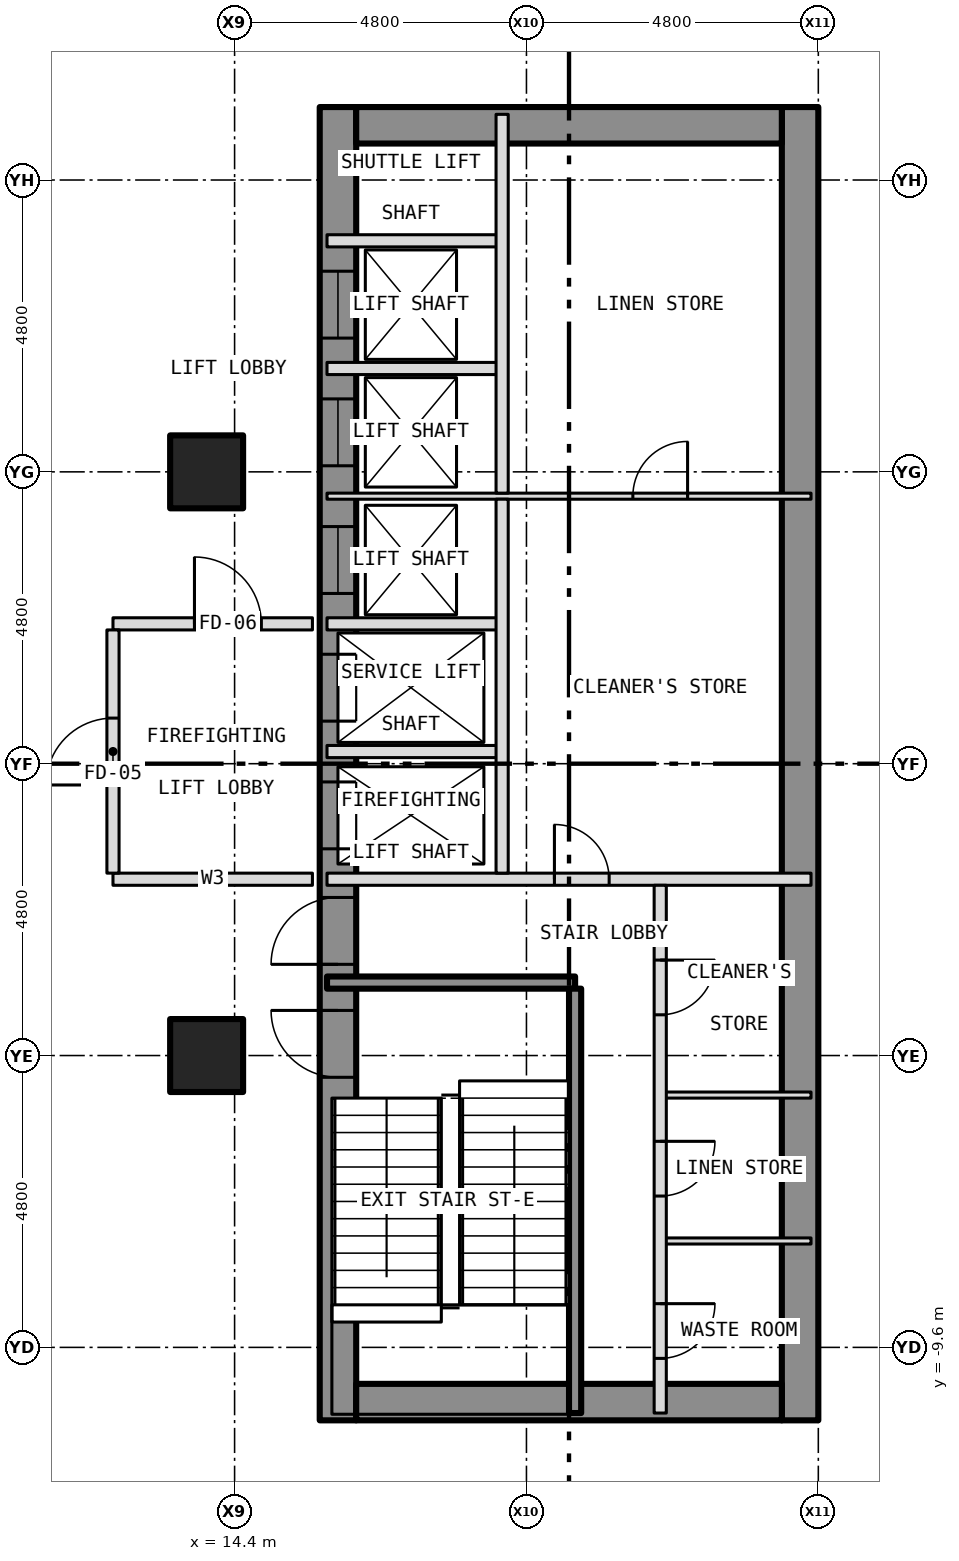
"""IFC4 building model, lengths in metres.
Left out: names, types, materials, properties, quantities, classifications, styles, units other than length and angle.
Written with IfcOpenShell. Run it as: python <this file> out.ifc"""

import sys

from ifc_helpers import new_model, si_unit, direction, frame, frame_2d, origin, origin_2d, place, context, subcontext, project, spatial, rectangle, hollow_rectangle, extrude, element, fill, save


model = new_model("IFC4")
c1 = context("Model", 3, precision=1e-05, world=origin(), true_north=direction((0.0, 1.0)))
c2 = subcontext(c1, "Body", "Model", "MODEL_VIEW")
j1 = project(units=[si_unit("LENGTHUNIT", "METRE"), si_unit("PLANEANGLEUNIT", "RADIAN")], contexts=[c1])
p1 = place(None, origin())
s1 = spatial("IfcSite", under=j1, at=p1, CompositionType="ELEMENT")
p2 = place(p1, origin())
s2 = spatial("IfcBuilding", under=s1, at=p2, CompositionType="ELEMENT")
p3 = place(p2, frame((0.0, 0.0, 20.0)))
s3 = spatial("IfcBuildingStorey", under=s2, at=p3, CompositionType="ELEMENT", Elevation=20.0)
for number, where, z_axis, x_axis in (
    (1, (13.94, -4.8, -0.2), (0.0, 0.0, 1.0), (1.0, 0.0, 0.0)),
    (2, (13.94, 4.8, -0.2), (0.0, 0.0, 1.0), (1.0, 0.0, 0.0)),
):
    element("IfcColumn", number, at=place(p3, frame(where, z_axis=z_axis, x_axis=x_axis)), inside=s3, PredefinedType="COLUMN", context=c2, shape_type="SweptSolid", body=[
        extrude(hollow_rectangle(XDim=1.2, YDim=1.2, WallThickness=0.07, at=origin_2d()), origin(), (0.0, 0.0, 1.0), 4.5),
    ])
p4 = place(p3, frame((16.1, -10.8, 0.0), z_axis=(0.0, 0.0, 1.0), x_axis=(0.0, 1.0, 0.0)))
e3 = element("IfcWall", 3, at=p4, inside=s3, PredefinedType="SHEAR", context=c2, shape_type="SweptSolid", body=[
    extrude(rectangle(XDim=21.6, YDim=0.6, at=frame_2d((10.8, 0.0))), origin(), (0.0, 0.0, 1.0), 4.2),
])
p5 = place(p4, frame((9.4, 0.0, 0.0)))
e4 = element("IfcOpeningElement", 4, at=p5, cuts=e3, PredefinedType="OPENING", context=c2, shape_type="SweptSolid", body=[
    extrude(rectangle(XDim=1.1, YDim=2.1, at=frame_2d((0.55, 1.05))), frame((0.0, 0.312, 0.0), z_axis=(0.0, -1.0, 0.0), x_axis=(1.0, 0.0, 0.0)), (0.0, 0.0, 1.0), 0.624),
])
p6 = place(p4, frame((11.5, 0.0, 0.0)))
e5 = element("IfcOpeningElement", 5, at=p6, cuts=e3, PredefinedType="OPENING", context=c2, shape_type="SweptSolid", body=[
    extrude(rectangle(XDim=1.1, YDim=2.1, at=frame_2d((0.55, 1.05))), frame((0.0, 0.312, 0.0), z_axis=(0.0, -1.0, 0.0), x_axis=(1.0, 0.0, 0.0)), (0.0, 0.0, 1.0), 0.624),
])
p7 = place(p4, frame((13.6, 0.0, 0.0)))
e6 = element("IfcOpeningElement", 6, at=p7, cuts=e3, PredefinedType="OPENING", context=c2, shape_type="SweptSolid", body=[
    extrude(rectangle(XDim=1.1, YDim=2.1, at=frame_2d((0.55, 1.05))), frame((0.0, 0.312, 0.0), z_axis=(0.0, -1.0, 0.0), x_axis=(1.0, 0.0, 0.0)), (0.0, 0.0, 1.0), 0.624),
])
p8 = place(p4, frame((15.7, 0.0, 0.0)))
e7 = element("IfcOpeningElement", 7, at=p8, cuts=e3, PredefinedType="OPENING", context=c2, shape_type="SweptSolid", body=[
    extrude(rectangle(XDim=1.1, YDim=2.1, at=frame_2d((0.55, 1.05))), frame((0.0, 0.312, 0.0), z_axis=(0.0, -1.0, 0.0), x_axis=(1.0, 0.0, 0.0)), (0.0, 0.0, 1.0), 0.624),
])
p9 = place(p4, frame((17.8, 0.0, 0.0)))
e8 = element("IfcOpeningElement", 8, at=p9, cuts=e3, PredefinedType="OPENING", context=c2, shape_type="SweptSolid", body=[
    extrude(rectangle(XDim=1.1, YDim=2.1, at=frame_2d((0.55, 1.05))), frame((0.0, 0.312, 0.0), z_axis=(0.0, -1.0, 0.0), x_axis=(1.0, 0.0, 0.0)), (0.0, 0.0, 1.0), 0.624),
])
p10 = place(p4, frame((5.642, 0.0, 0.0)))
e9 = element("IfcOpeningElement", 9, at=p10, cuts=e3, PredefinedType="OPENING", context=c2, shape_type="SweptSolid", body=[
    extrude(rectangle(XDim=1.1, YDim=2.1, at=frame_2d((0.55, 1.05))), frame((0.0, 0.312, 0.0), z_axis=(0.0, -1.0, 0.0), x_axis=(1.0, 0.0, 0.0)), (0.0, 0.0, 1.0), 0.624),
])
p11 = place(p4, frame((7.5, 0.0, 0.0)))
e10 = element("IfcOpeningElement", 10, at=p11, cuts=e3, PredefinedType="OPENING", context=c2, shape_type="SweptSolid", body=[
    extrude(rectangle(XDim=1.1, YDim=2.1, at=frame_2d((0.55, 1.05))), frame((0.0, 0.312, 0.0), z_axis=(0.0, -1.0, 0.0), x_axis=(1.0, 0.0, 0.0)), (0.0, 0.0, 1.0), 0.624),
])
p12 = place(p3, frame((23.7, -10.8, 0.0), z_axis=(0.0, 0.0, 1.0), x_axis=(0.0, 1.0, 0.0)))
e11 = element("IfcWall", 11, at=p12, inside=s3, PredefinedType="SHEAR", context=c2, shape_type="SweptSolid", body=[
    extrude(rectangle(XDim=21.6, YDim=0.6, at=frame_2d((10.8, 0.0))), origin(), (0.0, 0.0, 1.0), 4.2),
])
for number, where, z_axis, x_axis in (
    (12, (16.4, 10.5, 0.0), (0.0, 0.0, 1.0), (1.0, 0.0, 0.0)),
    (13, (16.4, -10.5, 0.0), (0.0, 0.0, 1.0), (1.0, 0.0, 0.0)),
):
    element("IfcWall", number, at=place(p3, frame(where, z_axis=z_axis, x_axis=x_axis)), inside=s3, PredefinedType="SHEAR", context=c2, shape_type="SweptSolid", body=[
        extrude(rectangle(XDim=7.0, YDim=0.6, at=frame_2d((3.5, 0.0))), origin(), (0.0, 0.0, 1.0), 4.2),
    ])
for number, where, z_axis, x_axis in (
    (14, (21.4, -7.85, 0.0), (0.0, 0.0, 1.0), (1.0, 0.0, 0.0)),
    (15, (21.4, -5.45, 0.0), (0.0, 0.0, 1.0), (1.0, 0.0, 0.0)),
):
    element("IfcWall", number, at=place(p3, frame(where, z_axis=z_axis, x_axis=x_axis)), inside=s3, PredefinedType="PARTITIONING", context=c2, shape_type="SweptSolid", body=[
        extrude(rectangle(XDim=2.48, YDim=0.1, at=frame_2d((1.24, 0.0))), origin(), (0.0, 0.0, 1.0), 4.2),
    ])
p13 = place(p3, frame((15.92, -3.6, 0.0), z_axis=(0.0, 0.0, 1.0), x_axis=(1.0, 0.0, 0.0)))
e16 = element("IfcWall", 16, at=p13, inside=s3, PredefinedType="SHEAR", context=c2, shape_type="SweptSolid", body=[
    extrude(rectangle(XDim=4.08, YDim=0.2, at=frame_2d((2.04, 0.0))), origin(), (0.0, 0.0, 1.0), 4.2),
])
p14 = place(p3, frame((12.4, -1.9, 0.0), z_axis=(0.0, 0.0, 1.0), x_axis=(1.0, 0.0, 0.0)))
e17 = element("IfcWall", 17, at=p14, inside=s3, PredefinedType="PARTITIONING", context=c2, shape_type="SweptSolid", body=[
    extrude(rectangle(XDim=3.28, YDim=0.2, at=frame_2d((1.64, 0.0))), origin(), (0.0, 0.0, 1.0), 4.3),
])
p15 = place(p3, frame((15.92, -1.9, 0.0), z_axis=(0.0, 0.0, 1.0), x_axis=(1.0, 0.0, 0.0)))
e18 = element("IfcWall", 18, at=p15, inside=s3, PredefinedType="PARTITIONING", context=c2, shape_type="SweptSolid", body=[
    extrude(rectangle(XDim=7.96, YDim=0.2, at=frame_2d((3.98, 0.0))), origin(), (0.0, 0.0, 1.0), 4.2),
])
p16 = place(p15, frame((3.74, 0.0, 0.0)))
e19 = element("IfcOpeningElement", 19, at=p16, cuts=e18, PredefinedType="OPENING", context=c2, shape_type="SweptSolid", body=[
    extrude(rectangle(XDim=0.9, YDim=2.1, at=frame_2d((0.45, 1.05))), frame((0.0, 0.112, 0.0), z_axis=(0.0, -1.0, 0.0), x_axis=(1.0, 0.0, 0.0)), (0.0, 0.0, 1.0), 0.224),
])
p17 = place(p3, frame((15.92, 0.2, 0.0), z_axis=(0.0, 0.0, 1.0), x_axis=(1.0, 0.0, 0.0)))
e20 = element("IfcWall", 20, at=p17, inside=s3, PredefinedType="PARTITIONING", context=c2, shape_type="SweptSolid", body=[
    extrude(rectangle(XDim=2.88, YDim=0.2, at=frame_2d((1.44, 0.0))), origin(), (0.0, 0.0, 1.0), 4.2),
])
p18 = place(p3, frame((12.4, 2.3, 0.0), z_axis=(0.0, 0.0, 1.0), x_axis=(1.0, 0.0, 0.0)))
e21 = element("IfcWall", 21, at=p18, inside=s3, PredefinedType="PARTITIONING", context=c2, shape_type="SweptSolid", body=[
    extrude(rectangle(XDim=3.28, YDim=0.2, at=frame_2d((1.64, 0.0))), origin(), (0.0, 0.0, 1.0), 4.3),
])
p19 = place(p18, frame((1.34, 0.0, 0.0)))
e22 = element("IfcOpeningElement", 22, at=p19, cuts=e21, PredefinedType="OPENING", context=c2, shape_type="SweptSolid", body=[
    extrude(rectangle(XDim=1.1, YDim=2.1, at=frame_2d((0.55, 1.05))), frame((0.0, 0.112, 0.0), z_axis=(0.0, -1.0, 0.0), x_axis=(1.0, 0.0, 0.0)), (0.0, 0.0, 1.0), 0.224),
])
p20 = place(p3, frame((15.92, 2.3, 0.0), z_axis=(0.0, 0.0, 1.0), x_axis=(1.0, 0.0, 0.0)))
e23 = element("IfcWall", 23, at=p20, inside=s3, PredefinedType="PARTITIONING", context=c2, shape_type="SweptSolid", body=[
    extrude(rectangle(XDim=2.88, YDim=0.2, at=frame_2d((1.44, 0.0))), origin(), (0.0, 0.0, 1.0), 4.2),
])
p21 = place(p3, frame((15.92, 4.4, 0.0), z_axis=(0.0, 0.0, 1.0), x_axis=(1.0, 0.0, 0.0)))
e24 = element("IfcWall", 24, at=p21, inside=s3, PredefinedType="PARTITIONING", context=c2, shape_type="SweptSolid", body=[
    extrude(rectangle(XDim=7.96, YDim=0.1, at=frame_2d((3.98, 0.0))), origin(), (0.0, 0.0, 1.0), 4.2),
])
p22 = place(p21, frame((5.03, 0.0, 0.0)))
e25 = element("IfcOpeningElement", 25, at=p22, cuts=e24, PredefinedType="OPENING", context=c2, shape_type="SweptSolid", body=[
    extrude(rectangle(XDim=0.9, YDim=2.1, at=frame_2d((0.45, 1.05))), frame((0.0, 0.062, 0.0), z_axis=(0.0, -1.0, 0.0), x_axis=(1.0, 0.0, 0.0)), (0.0, 0.0, 1.0), 0.124),
])
for number, where, z_axis, x_axis in (
    (26, (15.92, 6.5, 0.0), (0.0, 0.0, 1.0), (1.0, 0.0, 0.0)),
    (27, (15.92, 8.6, 0.0), (0.0, 0.0, 1.0), (1.0, 0.0, 0.0)),
):
    element("IfcWall", number, at=place(p3, frame(where, z_axis=z_axis, x_axis=x_axis)), inside=s3, PredefinedType="PARTITIONING", context=c2, shape_type="SweptSolid", body=[
        extrude(rectangle(XDim=2.88, YDim=0.2, at=frame_2d((1.44, 0.0))), origin(), (0.0, 0.0, 1.0), 4.2),
    ])
p23 = place(p3, frame((12.4, -1.8, 0.0), z_axis=(0.0, 0.0, 1.0), x_axis=(0.0, 1.0, 0.0)))
e28 = element("IfcWall", 28, at=p23, inside=s3, PredefinedType="PARTITIONING", context=c2, shape_type="SweptSolid", body=[
    extrude(rectangle(XDim=4.0, YDim=0.2, at=frame_2d((2.0, 0.0))), origin(), (0.0, 0.0, 1.0), 4.3),
])
p24 = place(p23, frame((1.45, 0.0, 0.0)))
e29 = element("IfcOpeningElement", 29, at=p24, cuts=e28, PredefinedType="OPENING", context=c2, shape_type="SweptSolid", body=[
    extrude(rectangle(XDim=1.1, YDim=2.1, at=frame_2d((0.55, 1.05))), frame((0.0, 0.112, 0.0), z_axis=(0.0, -1.0, 0.0), x_axis=(1.0, 0.0, 0.0)), (0.0, 0.0, 1.0), 0.224),
])
p25 = place(p3, frame((18.8, -1.8, 0.0), z_axis=(0.0, 0.0, 1.0), x_axis=(0.0, 1.0, 0.0)))
e30 = element("IfcWall", 30, at=p25, inside=s3, PredefinedType="PARTITIONING", context=c2, shape_type="SweptSolid", body=[
    extrude(rectangle(XDim=6.15, YDim=0.2, at=frame_2d((3.075, 0.0))), origin(), (0.0, 0.0, 1.0), 4.2),
])
p26 = place(p3, frame((18.8, 4.45, 0.0), z_axis=(0.0, 0.0, 1.0), x_axis=(0.0, 1.0, 0.0)))
e31 = element("IfcWall", 31, at=p26, inside=s3, PredefinedType="PARTITIONING", context=c2, shape_type="SweptSolid", body=[
    extrude(rectangle(XDim=6.23, YDim=0.2, at=frame_2d((3.115, 0.0))), origin(), (0.0, 0.0, 1.0), 4.2),
])
p27 = place(p3, frame((20.0, -10.68, 0.0), z_axis=(0.0, 0.0, 1.0), x_axis=(0.0, 1.0, 0.0)))
e32 = element("IfcWall", 32, at=p27, inside=s3, PredefinedType="SHEAR", context=c2, shape_type="SweptSolid", body=[
    extrude(rectangle(XDim=6.98, YDim=0.2, at=frame_2d((3.49, 0.0))), origin(), (0.0, 0.0, 1.0), 4.2),
])
p28 = place(p3, frame((21.4, -10.68, 0.0), z_axis=(0.0, 0.0, 1.0), x_axis=(0.0, 1.0, 0.0)))
e33 = element("IfcWall", 33, at=p28, inside=s3, PredefinedType="PARTITIONING", context=c2, shape_type="SweptSolid", body=[
    extrude(rectangle(XDim=8.68, YDim=0.2, at=frame_2d((4.34, 0.0))), origin(), (0.0, 0.0, 1.0), 4.2),
])
p29 = place(p28, frame((0.899, 0.0, 0.0)))
e34 = element("IfcOpeningElement", 34, at=p29, cuts=e33, PredefinedType="OPENING", context=c2, shape_type="SweptSolid", body=[
    extrude(rectangle(XDim=0.9, YDim=2.1, at=frame_2d((0.45, 1.05))), frame((0.0, 0.112, 0.0), z_axis=(0.0, -1.0, 0.0), x_axis=(1.0, 0.0, 0.0)), (0.0, 0.0, 1.0), 0.224),
])
p30 = place(p28, frame((3.569, 0.0, 0.0)))
e35 = element("IfcOpeningElement", 35, at=p30, cuts=e33, PredefinedType="OPENING", context=c2, shape_type="SweptSolid", body=[
    extrude(rectangle(XDim=0.9, YDim=2.1, at=frame_2d((0.45, 1.05))), frame((0.0, 0.112, 0.0), z_axis=(0.0, -1.0, 0.0), x_axis=(1.0, 0.0, 0.0)), (0.0, 0.0, 1.0), 0.224),
])
p31 = place(p28, frame((6.55, 0.0, 0.0)))
e36 = element("IfcOpeningElement", 36, at=p31, cuts=e33, PredefinedType="OPENING", context=c2, shape_type="SweptSolid", body=[
    extrude(rectangle(XDim=0.9, YDim=2.1, at=frame_2d((0.45, 1.05))), frame((0.0, 0.112, 0.0), z_axis=(0.0, -1.0, 0.0), x_axis=(1.0, 0.0, 0.0)), (0.0, 0.0, 1.0), 0.224),
])
p32 = place(p5, origin())
e37 = element("IfcDoor", 37, at=p32, inside=s3, OperationType="SLIDING_TO_LEFT", PredefinedType="DOOR", context=c2, shape_type="SweptSolid", body=[
    extrude(rectangle(XDim=1.1, YDim=2.1, at=frame_2d((0.55, 1.05))), frame((0.0, 0.025, 0.0), z_axis=(0.0, -1.0, 0.0), x_axis=(1.0, 0.0, 0.0)), (0.0, 0.0, 1.0), 0.05),
])
fill(e4, e37)
p33 = place(p6, origin())
e38 = element("IfcDoor", 38, at=p33, inside=s3, OperationType="SLIDING_TO_LEFT", PredefinedType="DOOR", context=c2, shape_type="SweptSolid", body=[
    extrude(rectangle(XDim=1.1, YDim=2.1, at=frame_2d((0.55, 1.05))), frame((0.0, 0.025, 0.0), z_axis=(0.0, -1.0, 0.0), x_axis=(1.0, 0.0, 0.0)), (0.0, 0.0, 1.0), 0.05),
])
fill(e5, e38)
p34 = place(p7, origin())
e39 = element("IfcDoor", 39, at=p34, inside=s3, OperationType="SLIDING_TO_LEFT", PredefinedType="DOOR", context=c2, shape_type="SweptSolid", body=[
    extrude(rectangle(XDim=1.1, YDim=2.1, at=frame_2d((0.55, 1.05))), frame((0.0, 0.025, 0.0), z_axis=(0.0, -1.0, 0.0), x_axis=(1.0, 0.0, 0.0)), (0.0, 0.0, 1.0), 0.05),
])
fill(e6, e39)
p35 = place(p8, origin())
e40 = element("IfcDoor", 40, at=p35, inside=s3, OperationType="SLIDING_TO_LEFT", PredefinedType="DOOR", context=c2, shape_type="SweptSolid", body=[
    extrude(rectangle(XDim=1.1, YDim=2.1, at=frame_2d((0.55, 1.05))), frame((0.0, 0.025, 0.0), z_axis=(0.0, -1.0, 0.0), x_axis=(1.0, 0.0, 0.0)), (0.0, 0.0, 1.0), 0.05),
])
fill(e7, e40)
p36 = place(p9, origin())
e41 = element("IfcDoor", 41, at=p36, inside=s3, OperationType="SLIDING_TO_LEFT", PredefinedType="DOOR", context=c2, shape_type="SweptSolid", body=[
    extrude(rectangle(XDim=1.1, YDim=2.1, at=frame_2d((0.55, 1.05))), frame((0.0, 0.025, 0.0), z_axis=(0.0, -1.0, 0.0), x_axis=(1.0, 0.0, 0.0)), (0.0, 0.0, 1.0), 0.05),
])
fill(e8, e41)
p37 = place(p10, origin())
e42 = element("IfcDoor", 42, at=p37, inside=s3, OperationType="SINGLE_SWING_RIGHT", PredefinedType="DOOR", context=c2, shape_type="SweptSolid", body=[
    extrude(rectangle(XDim=1.1, YDim=2.1, at=frame_2d((0.55, 1.05))), frame((0.0, 0.025, 0.0), z_axis=(0.0, -1.0, 0.0), x_axis=(1.0, 0.0, 0.0)), (0.0, 0.0, 1.0), 0.05),
])
fill(e9, e42)
p38 = place(p11, origin())
e43 = element("IfcDoor", 43, at=p38, inside=s3, OperationType="SINGLE_SWING_LEFT", PredefinedType="DOOR", context=c2, shape_type="SweptSolid", body=[
    extrude(rectangle(XDim=1.1, YDim=2.1, at=frame_2d((0.55, 1.05))), frame((0.0, 0.025, 0.0), z_axis=(0.0, -1.0, 0.0), x_axis=(1.0, 0.0, 0.0)), (0.0, 0.0, 1.0), 0.05),
])
fill(e10, e43)
p39 = place(p29, origin())
e44 = element("IfcDoor", 44, at=p39, inside=s3, OperationType="SINGLE_SWING_RIGHT", PredefinedType="DOOR", context=c2, shape_type="SweptSolid", body=[
    extrude(rectangle(XDim=0.9, YDim=2.1, at=frame_2d((0.45, 1.05))), frame((0.0, 0.025, 0.0), z_axis=(0.0, -1.0, 0.0), x_axis=(1.0, 0.0, 0.0)), (0.0, 0.0, 1.0), 0.05),
])
fill(e34, e44)
p40 = place(p30, origin())
e45 = element("IfcDoor", 45, at=p40, inside=s3, OperationType="SINGLE_SWING_RIGHT", PredefinedType="DOOR", context=c2, shape_type="SweptSolid", body=[
    extrude(rectangle(XDim=0.9, YDim=2.1, at=frame_2d((0.45, 1.05))), frame((0.0, 0.025, 0.0), z_axis=(0.0, -1.0, 0.0), x_axis=(1.0, 0.0, 0.0)), (0.0, 0.0, 1.0), 0.05),
])
fill(e35, e45)
p41 = place(p31, origin())
e46 = element("IfcDoor", 46, at=p41, inside=s3, OperationType="SINGLE_SWING_RIGHT", PredefinedType="DOOR", context=c2, shape_type="SweptSolid", body=[
    extrude(rectangle(XDim=0.9, YDim=2.1, at=frame_2d((0.45, 1.05))), frame((0.0, 0.025, 0.0), z_axis=(0.0, -1.0, 0.0), x_axis=(1.0, 0.0, 0.0)), (0.0, 0.0, 1.0), 0.05),
])
fill(e36, e46)
p42 = place(p16, origin())
e47 = element("IfcDoor", 47, at=p42, inside=s3, OperationType="SINGLE_SWING_LEFT", PredefinedType="DOOR", context=c2, shape_type="SweptSolid", body=[
    extrude(rectangle(XDim=0.9, YDim=2.1, at=frame_2d((0.45, 1.05))), frame((0.0, 0.025, 0.0), z_axis=(0.0, -1.0, 0.0), x_axis=(1.0, 0.0, 0.0)), (0.0, 0.0, 1.0), 0.05),
])
fill(e19, e47)
p43 = place(p22, origin())
e48 = element("IfcDoor", 48, at=p43, inside=s3, OperationType="SINGLE_SWING_RIGHT", PredefinedType="DOOR", context=c2, shape_type="SweptSolid", body=[
    extrude(rectangle(XDim=0.9, YDim=2.1, at=frame_2d((0.45, 1.05))), frame((0.0, 0.025, 0.0), z_axis=(0.0, -1.0, 0.0), x_axis=(1.0, 0.0, 0.0)), (0.0, 0.0, 1.0), 0.05),
])
fill(e25, e48)
p44 = place(p24, origin())
e49 = element("IfcDoor", 49, at=p44, inside=s3, OperationType="SINGLE_SWING_LEFT", PredefinedType="DOOR", context=c2, shape_type="SweptSolid", body=[
    extrude(rectangle(XDim=1.1, YDim=2.1, at=frame_2d((0.55, 1.05))), frame((0.0, 0.025, 0.0), z_axis=(0.0, -1.0, 0.0), x_axis=(1.0, 0.0, 0.0)), (0.0, 0.0, 1.0), 0.05),
])
fill(e29, e49)
p45 = place(p19, origin())
e50 = element("IfcDoor", 50, at=p45, inside=s3, OperationType="SINGLE_SWING_LEFT", PredefinedType="DOOR", context=c2, shape_type="SweptSolid", body=[
    extrude(rectangle(XDim=1.1, YDim=2.1, at=frame_2d((0.55, 1.05))), frame((0.0, 0.025, 0.0), z_axis=(0.0, -1.0, 0.0), x_axis=(1.0, 0.0, 0.0)), (0.0, 0.0, 1.0), 0.05),
])
fill(e22, e50)
save(model, sys.argv[1])
